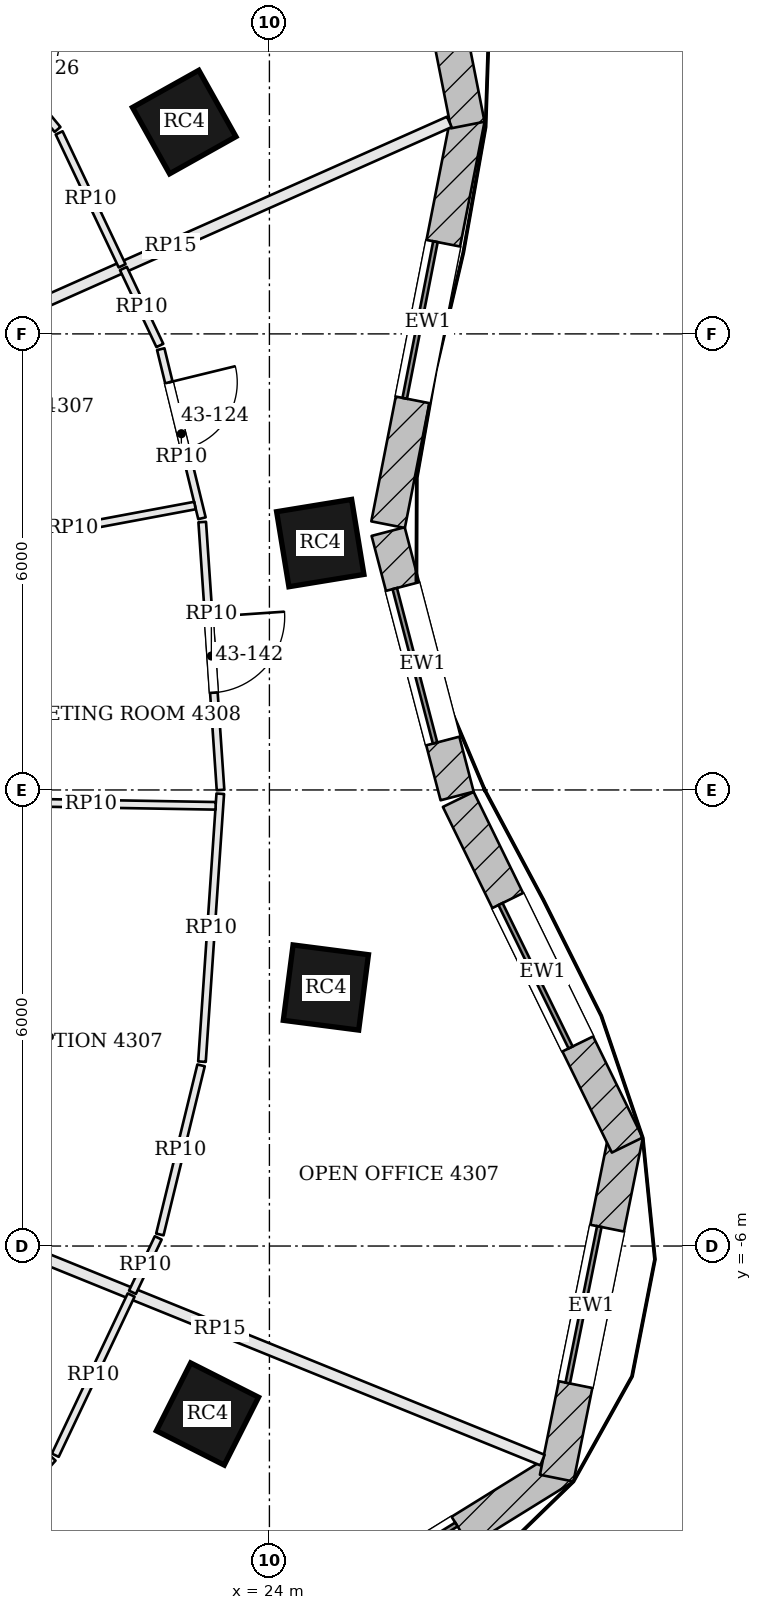
"""IFC4 building model, lengths in metres.
Left out: names, types, materials, properties, quantities, classifications, styles, units other than length and angle.
Written with IfcOpenShell. Run it as: python <this file> out.ifc"""

import sys

from ifc_helpers import new_model, si_unit, direction, frame, frame_2d, origin, origin_2d, place, context, subcontext, project, spatial, rectangle, extrude, element, fill, save


model = new_model("IFC4")
c1 = context("Model", 3, precision=1e-05, world=origin(), true_north=direction((0.0, 1.0)))
c2 = subcontext(c1, "Body", "Model", "MODEL_VIEW")
j1 = project(units=[si_unit("LENGTHUNIT", "METRE"), si_unit("PLANEANGLEUNIT", "RADIAN")], contexts=[c1])
p1 = place(None, origin())
s1 = spatial("IfcSite", under=j1, at=p1, CompositionType="ELEMENT")
p2 = place(p1, origin())
s2 = spatial("IfcBuilding", under=s1, at=p2, CompositionType="ELEMENT")
p3 = place(p2, frame((0.0, 0.0, 177.9)))
s3 = spatial("IfcBuildingStorey", under=s2, at=p3, CompositionType="ELEMENT", Elevation=177.9)
for number, where, z_axis, x_axis in (
    (1, (24.669, 3.248, 0.0), (0.0, 0.0, 1.0), (-0.162, 0.987, 0.0)),
    (2, (22.879, 8.787, 0.0), (0.0, 0.0, 1.0), (-0.489, 0.873, 0.0)),
    (3, (23.185, -8.21, 0.0), (0.0, 0.0, 1.0), (0.451, 0.893, 0.0)),
    (4, (24.743, -2.599, 0.0), (0.0, 0.0, 1.0), (0.128, 0.992, 0.0)),
):
    element("IfcColumn", number, at=place(p3, frame(where, z_axis=z_axis, x_axis=x_axis)), inside=s3, PredefinedType="COLUMN", context=c2, shape_type="SweptSolid", body=[
        extrude(rectangle(XDim=1.0, YDim=1.0, at=origin_2d()), origin(), (0.0, 0.0, 1.0), 3.9),
    ])
p4 = place(p3, frame((26.469, -0.079, 0.0), z_axis=(0.0, 0.0, 1.0), x_axis=(-0.252446779859, 0.967610780913, 0.0)))
e5 = element("IfcWall", 5, at=p4, inside=s3, PredefinedType="SOLIDWALL", context=c2, shape_type="SweptSolid", body=[
    extrude(rectangle(XDim=3.595, YDim=0.45, at=frame_2d((1.797, 0.0))), origin(), (0.0, 0.0, 1.0), 3.7),
])
p5 = place(p4, frame((0.747, 0.0, 0.9)))
e6 = element("IfcOpeningElement", 6, at=p5, cuts=e5, PredefinedType="OPENING", context=c2, shape_type="SweptSolid", body=[
    extrude(rectangle(XDim=2.1, YDim=2.3, at=frame_2d((1.05, 1.15))), frame((0.0, 0.235, 0.0), z_axis=(0.0, -1.0, 0.0), x_axis=(1.0, 0.0, 0.0)), (0.0, 0.0, 1.0), 0.47),
])
p6 = place(p3, frame((25.561, 3.49, 0.0), z_axis=(0.0, 0.0, 1.0), x_axis=(0.192494026297, 0.981298145234, 0.0)))
e7 = element("IfcWall", 7, at=p6, inside=s3, PredefinedType="SOLIDWALL", context=c2, shape_type="SweptSolid", body=[
    extrude(rectangle(XDim=5.446, YDim=0.45, at=frame_2d((2.723, 0.0))), origin(), (0.0, 0.0, 1.0), 3.7),
])
p7 = place(p6, frame((1.673, 0.0, 0.9)))
e8 = element("IfcOpeningElement", 8, at=p7, cuts=e7, PredefinedType="OPENING", context=c2, shape_type="SweptSolid", body=[
    extrude(rectangle(XDim=2.1, YDim=2.3, at=frame_2d((1.05, 1.15))), frame((0.0, 0.235, 0.0), z_axis=(0.0, -1.0, 0.0), x_axis=(1.0, 0.0, 0.0)), (0.0, 0.0, 1.0), 0.47),
])
p8 = place(p3, frame((26.61, 8.748, 0.0), z_axis=(0.0, 0.0, 1.0), x_axis=(-0.193923166402, 0.981016720312, 0.0)))
e9 = element("IfcWall", 9, at=p8, inside=s3, PredefinedType="SOLIDWALL", context=c2, shape_type="SweptSolid", body=[
    extrude(rectangle(XDim=4.518, YDim=0.45, at=frame_2d((2.259, 0.0))), origin(), (0.0, 0.0, 1.0), 3.7),
])
p9 = place(p8, frame((1.209, 0.0, 0.9)))
e10 = element("IfcOpeningElement", 10, at=p9, cuts=e9, PredefinedType="OPENING", context=c2, shape_type="SweptSolid", body=[
    extrude(rectangle(XDim=2.1, YDim=2.3, at=frame_2d((1.05, 1.15))), frame((0.0, 0.235, 0.0), z_axis=(0.0, -1.0, 0.0), x_axis=(1.0, 0.0, 0.0)), (0.0, 0.0, 1.0), 0.47),
])
p10 = place(p3, frame((23.368, -11.701, 0.0), z_axis=(0.0, 0.0, 1.0), x_axis=(0.850251408633, 0.526376806211, 0.0)))
e11 = element("IfcWall", 11, at=p10, inside=s3, PredefinedType="SOLIDWALL", context=c2, shape_type="SweptSolid", body=[
    extrude(rectangle(XDim=5.302, YDim=0.45, at=frame_2d((2.651, 0.0))), origin(), (0.0, 0.0, 1.0), 3.7),
])
p11 = place(p10, frame((1.601, 0.0, 0.9)))
e12 = element("IfcOpeningElement", 12, at=p11, cuts=e11, PredefinedType="OPENING", context=c2, shape_type="SweptSolid", body=[
    extrude(rectangle(XDim=2.1, YDim=2.3, at=frame_2d((1.05, 1.15))), frame((0.0, 0.235, 0.0), z_axis=(0.0, -1.0, 0.0), x_axis=(1.0, 0.0, 0.0)), (0.0, 0.0, 1.0), 0.47),
])
p12 = place(p3, frame((27.78, -9.053, 0.0), z_axis=(0.0, 0.0, 1.0), x_axis=(0.197796229105, 0.980243159503, 0.0)))
e13 = element("IfcWall", 13, at=p12, inside=s3, PredefinedType="SOLIDWALL", context=c2, shape_type="SweptSolid", body=[
    extrude(rectangle(XDim=4.61, YDim=0.45, at=frame_2d((2.305, 0.0))), origin(), (0.0, 0.0, 1.0), 3.7),
])
p13 = place(p12, frame((1.255, 0.0, 0.9)))
e14 = element("IfcOpeningElement", 14, at=p13, cuts=e13, PredefinedType="OPENING", context=c2, shape_type="SweptSolid", body=[
    extrude(rectangle(XDim=2.1, YDim=2.3, at=frame_2d((1.05, 1.15))), frame((0.0, 0.235, 0.0), z_axis=(0.0, -1.0, 0.0), x_axis=(1.0, 0.0, 0.0)), (0.0, 0.0, 1.0), 0.47),
])
p14 = place(p3, frame((28.707, -4.672, 0.0), z_axis=(0.0, 0.0, 1.0), x_axis=(-0.439053549989, 0.898460895221, 0.0)))
e15 = element("IfcWall", 15, at=p14, inside=s3, PredefinedType="SOLIDWALL", context=c2, shape_type="SweptSolid", body=[
    extrude(rectangle(XDim=5.062, YDim=0.45, at=frame_2d((2.531, 0.0))), origin(), (0.0, 0.0, 1.0), 3.7),
])
p15 = place(p14, frame((1.481, 0.0, 0.9)))
e16 = element("IfcOpeningElement", 16, at=p15, cuts=e15, PredefinedType="OPENING", context=c2, shape_type="SweptSolid", body=[
    extrude(rectangle(XDim=2.1, YDim=2.3, at=frame_2d((1.05, 1.15))), frame((0.0, 0.235, 0.0), z_axis=(0.0, -1.0, 0.0), x_axis=(1.0, 0.0, 0.0)), (0.0, 0.0, 1.0), 0.47),
])
p16 = place(p3, frame((21.493, 15.114, 0.0), z_axis=(0.0, 0.0, 1.0), x_axis=(-0.659778549164, -0.751460089467, 0.0)))
e17 = element("IfcWall", 17, at=p16, inside=s3, PredefinedType="PARTITIONING", context=c2, shape_type="SweptSolid", body=[
    extrude(rectangle(XDim=7.877, YDim=0.15, at=frame_2d((3.938, 0.0))), origin(), (0.0, 0.0, 1.0), 3.234),
])
p17 = place(p3, frame((27.593, -8.816, 0.0), z_axis=(0.0, 0.0, 1.0), x_axis=(-0.9267854071, 0.375591279433, 0.0)))
e18 = element("IfcWall", 18, at=p17, inside=s3, PredefinedType="PARTITIONING", context=c2, shape_type="SweptSolid", body=[
    extrude(rectangle(XDim=9.161, YDim=0.15, at=frame_2d((4.58, 0.0))), origin(), (0.0, 0.0, 1.0), 3.234),
])
p18 = place(p3, frame((26.367, 8.789, 0.0), z_axis=(0.0, 0.0, 1.0), x_axis=(-0.913673557468, -0.406448804137, 0.0)))
e19 = element("IfcWall", 19, at=p18, inside=s3, PredefinedType="PARTITIONING", context=c2, shape_type="SweptSolid", body=[
    extrude(rectangle(XDim=8.029, YDim=0.15, at=frame_2d((4.014, 0.0))), origin(), (0.0, 0.0, 1.0), 3.234),
])
p19 = place(p3, frame((22.181, -6.645, 0.0), z_axis=(0.0, 0.0, 1.0), x_axis=(-0.428144841987, -0.903710127353, 0.0)))
e20 = element("IfcWall", 20, at=p19, inside=s3, PredefinedType="PARTITIONING", context=c2, shape_type="SweptSolid", body=[
    extrude(rectangle(XDim=2.332, YDim=0.1, at=frame_2d((1.166, 0.0))), origin(), (0.0, 0.0, 1.0), 3.084),
])
p20 = place(p3, frame((21.149, -8.789, 0.0), z_axis=(0.0, 0.0, 1.0), x_axis=(-0.666915902537, -0.745132994132, 0.0)))
e21 = element("IfcWall", 21, at=p20, inside=s3, PredefinedType="PARTITIONING", context=c2, shape_type="SweptSolid", body=[
    extrude(rectangle(XDim=4.186, YDim=0.1, at=frame_2d((2.093, 0.0))), origin(), (0.0, 0.0, 1.0), 3.084),
])
p21 = place(p20, frame((1.869, 0.0, 0.0)))
e22 = element("IfcOpeningElement", 22, at=p21, cuts=e21, PredefinedType="OPENING", context=c2, shape_type="SweptSolid", body=[
    extrude(rectangle(XDim=0.9, YDim=2.1, at=frame_2d((0.45, 1.05))), frame((0.0, 0.06, 0.0), z_axis=(0.0, -1.0, 0.0), x_axis=(1.0, 0.0, 0.0)), (0.0, 0.0, 1.0), 0.12),
])
p22 = place(p3, frame((22.079, 6.86, 0.0), z_axis=(0.0, 0.0, 1.0), x_axis=(0.428105084675, -0.903728961844, 0.0)))
e23 = element("IfcWall", 23, at=p22, inside=s3, PredefinedType="PARTITIONING", context=c2, shape_type="SweptSolid", body=[
    extrude(rectangle(XDim=1.12, YDim=0.1, at=frame_2d((0.56, 0.0))), origin(), (0.0, 0.0, 1.0), 3.084),
])
p23 = place(p3, frame((22.57, 5.799, 0.0), z_axis=(0.0, 0.0, 1.0), x_axis=(0.236811358433, -0.971555649727, 0.0)))
e24 = element("IfcWall", 24, at=p23, inside=s3, PredefinedType="PARTITIONING", context=c2, shape_type="SweptSolid", body=[
    extrude(rectangle(XDim=2.29, YDim=0.1, at=frame_2d((1.145, 0.0))), origin(), (0.0, 0.0, 1.0), 3.084),
])
p24 = place(p23, frame((0.45, 0.0, 0.0)))
e25 = element("IfcOpeningElement", 25, at=p24, cuts=e24, PredefinedType="OPENING", context=c2, shape_type="SweptSolid", body=[
    extrude(rectangle(XDim=0.9, YDim=2.1, at=frame_2d((0.45, 1.05))), frame((0.0, 0.06, 0.0), z_axis=(0.0, -1.0, 0.0), x_axis=(1.0, 0.0, 0.0)), (0.0, 0.0, 1.0), 0.12),
])
p25 = place(p3, frame((23.116, 3.525, 0.0), z_axis=(0.0, 0.0, 1.0), x_axis=(0.068138009452, -0.997675905125, 0.0)))
e26 = element("IfcWall", 26, at=p25, inside=s3, PredefinedType="PARTITIONING", context=c2, shape_type="SweptSolid", body=[
    extrude(rectangle(XDim=3.533, YDim=0.1, at=frame_2d((1.767, 0.0))), origin(), (0.0, 0.0, 1.0), 3.084),
])
p26 = place(p25, frame((1.25, 0.0, 0.0)))
e27 = element("IfcOpeningElement", 27, at=p26, cuts=e26, PredefinedType="OPENING", context=c2, shape_type="SweptSolid", body=[
    extrude(rectangle(XDim=1.0, YDim=2.4, at=frame_2d((0.5, 1.2))), frame((0.0, 0.06, 0.0), z_axis=(0.0, -1.0, 0.0), x_axis=(1.0, 0.0, 0.0)), (0.0, 0.0, 1.0), 0.12),
])
p27 = place(p3, frame((23.354, -0.05, 0.0), z_axis=(0.0, 0.0, 1.0), x_axis=(-0.06820679361, -0.99767120501, 0.0)))
e28 = element("IfcWall", 28, at=p27, inside=s3, PredefinedType="PARTITIONING", context=c2, shape_type="SweptSolid", body=[
    extrude(rectangle(XDim=3.533, YDim=0.1, at=frame_2d((1.767, 0.0))), origin(), (0.0, 0.0, 1.0), 3.084),
])
p28 = place(p3, frame((23.101, -3.623, 0.0), z_axis=(0.0, 0.0, 1.0), x_axis=(-0.236811358433, -0.971555649727, 0.0)))
e29 = element("IfcWall", 29, at=p28, inside=s3, PredefinedType="PARTITIONING", context=c2, shape_type="SweptSolid", body=[
    extrude(rectangle(XDim=2.29, YDim=0.1, at=frame_2d((1.145, 0.0))), origin(), (0.0, 0.0, 1.0), 3.084),
])
p29 = place(p3, frame((22.537, -5.893, 0.0), z_axis=(0.0, 0.0, 1.0), x_axis=(-0.427993557618, -0.903781784856, 0.0)))
e30 = element("IfcWall", 30, at=p29, inside=s3, PredefinedType="PARTITIONING", context=c2, shape_type="SweptSolid", body=[
    extrude(rectangle(XDim=0.792, YDim=0.1, at=frame_2d((0.396, 0.0))), origin(), (0.0, 0.0, 1.0), 3.084),
])
p30 = place(p3, frame((20.013, -0.153, 0.0), z_axis=(0.0, 0.0, 1.0), x_axis=(0.999854678593, -0.017047630214, 0.0)))
e31 = element("IfcWall", 31, at=p30, inside=s3, PredefinedType="PARTITIONING", context=c2, shape_type="SweptSolid", body=[
    extrude(rectangle(XDim=3.28, YDim=0.1, at=frame_2d((1.64, 0.0))), origin(), (0.0, 0.0, 1.0), 3.084),
])
p31 = place(p3, frame((19.796, 3.14, 0.0), z_axis=(0.0, 0.0, 1.0), x_axis=(0.983010938824, 0.183546980778, 0.0)))
e32 = element("IfcWall", 32, at=p31, inside=s3, PredefinedType="PARTITIONING", context=c2, shape_type="SweptSolid", body=[
    extrude(rectangle(XDim=3.28, YDim=0.1, at=frame_2d((1.64, 0.0))), origin(), (0.0, 0.0, 1.0), 3.084),
])
p32 = place(p3, frame((19.206, 11.121, 0.0), z_axis=(0.0, 0.0, 1.0), x_axis=(0.636597206989, -0.771196470462, 0.0)))
e33 = element("IfcWall", 33, at=p32, inside=s3, PredefinedType="PARTITIONING", context=c2, shape_type="SweptSolid", body=[
    extrude(rectangle(XDim=3.152, YDim=0.1, at=frame_2d((1.576, 0.0))), origin(), (0.0, 0.0, 1.0), 3.084),
])
p33 = place(p32, frame((1.619, 0.0, 0.0)))
e34 = element("IfcOpeningElement", 34, at=p33, cuts=e33, PredefinedType="OPENING", context=c2, shape_type="SweptSolid", body=[
    extrude(rectangle(XDim=1.0, YDim=2.1, at=frame_2d((0.5, 1.05))), frame((0.0, 0.06, 0.0), z_axis=(0.0, -1.0, 0.0), x_axis=(1.0, 0.0, 0.0)), (0.0, 0.0, 1.0), 0.12),
])
p34 = place(p3, frame((21.234, 8.644, 0.0), z_axis=(0.0, 0.0, 1.0), x_axis=(0.428183987328, -0.903691580682, 0.0)))
e35 = element("IfcWall", 35, at=p34, inside=s3, PredefinedType="PARTITIONING", context=c2, shape_type="SweptSolid", body=[
    extrude(rectangle(XDim=1.935, YDim=0.1, at=frame_2d((0.967, 0.0))), origin(), (0.0, 0.0, 1.0), 3.084),
])
p35 = place(p5, origin())
e36 = element("IfcWindow", 36, at=p35, inside=s3, PartitioningType="SINGLE_PANEL", PredefinedType="WINDOW", context=c2, shape_type="SweptSolid", body=[
    extrude(rectangle(XDim=2.1, YDim=2.3, at=frame_2d((1.05, 1.15))), frame((0.0, 0.135, 0.0), z_axis=(0.0, -1.0, 0.0), x_axis=(1.0, 0.0, 0.0)), (0.0, 0.0, 1.0), 0.06),
])
fill(e6, e36)
p36 = place(p7, origin())
e37 = element("IfcWindow", 37, at=p36, inside=s3, PartitioningType="SINGLE_PANEL", PredefinedType="WINDOW", context=c2, shape_type="SweptSolid", body=[
    extrude(rectangle(XDim=2.1, YDim=2.3, at=frame_2d((1.05, 1.15))), frame((0.0, 0.135, 0.0), z_axis=(0.0, -1.0, 0.0), x_axis=(1.0, 0.0, 0.0)), (0.0, 0.0, 1.0), 0.06),
])
fill(e8, e37)
p37 = place(p11, origin())
e38 = element("IfcWindow", 38, at=p37, inside=s3, PartitioningType="SINGLE_PANEL", PredefinedType="WINDOW", context=c2, shape_type="SweptSolid", body=[
    extrude(rectangle(XDim=2.1, YDim=2.3, at=frame_2d((1.05, 1.15))), frame((0.0, 0.135, 0.0), z_axis=(0.0, -1.0, 0.0), x_axis=(1.0, 0.0, 0.0)), (0.0, 0.0, 1.0), 0.06),
])
fill(e12, e38)
p38 = place(p13, origin())
e39 = element("IfcWindow", 39, at=p38, inside=s3, PartitioningType="SINGLE_PANEL", PredefinedType="WINDOW", context=c2, shape_type="SweptSolid", body=[
    extrude(rectangle(XDim=2.1, YDim=2.3, at=frame_2d((1.05, 1.15))), frame((0.0, 0.135, 0.0), z_axis=(0.0, -1.0, 0.0), x_axis=(1.0, 0.0, 0.0)), (0.0, 0.0, 1.0), 0.06),
])
fill(e14, e39)
p39 = place(p15, origin())
e40 = element("IfcWindow", 40, at=p39, inside=s3, PartitioningType="SINGLE_PANEL", PredefinedType="WINDOW", context=c2, shape_type="SweptSolid", body=[
    extrude(rectangle(XDim=2.1, YDim=2.3, at=frame_2d((1.05, 1.15))), frame((0.0, 0.135, 0.0), z_axis=(0.0, -1.0, 0.0), x_axis=(1.0, 0.0, 0.0)), (0.0, 0.0, 1.0), 0.06),
])
fill(e16, e40)
p40 = place(p24, origin())
e41 = element("IfcDoor", 41, at=p40, inside=s3, OperationType="SINGLE_SWING_LEFT", PredefinedType="DOOR", context=c2, shape_type="SweptSolid", body=[
    extrude(rectangle(XDim=0.9, YDim=2.1, at=frame_2d((0.45, 1.05))), frame((0.0, 0.025, 0.0), z_axis=(0.0, -1.0, 0.0), x_axis=(1.0, 0.0, 0.0)), (0.0, 0.0, 1.0), 0.05),
])
fill(e25, e41)
p41 = place(p26, origin())
e42 = element("IfcDoor", 42, at=p41, inside=s3, OperationType="SINGLE_SWING_LEFT", PredefinedType="DOOR", context=c2, shape_type="SweptSolid", body=[
    extrude(rectangle(XDim=1.0, YDim=2.4, at=frame_2d((0.5, 1.2))), frame((0.0, 0.025, 0.0), z_axis=(0.0, -1.0, 0.0), x_axis=(1.0, 0.0, 0.0)), (0.0, 0.0, 1.0), 0.05),
])
fill(e27, e42)
save(model, sys.argv[1])
